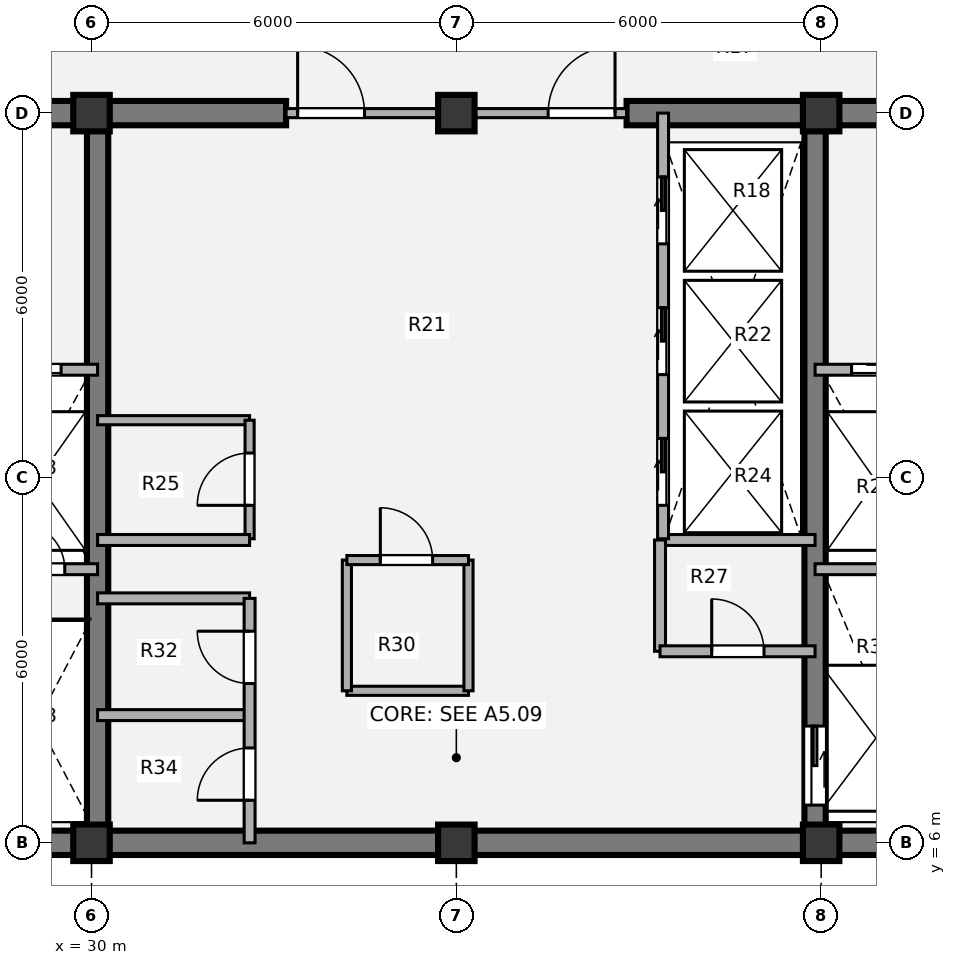
"""IFC4 building model, lengths in metres.
Left out: names, types, materials, properties, quantities, classifications, styles, units other than length and angle.
Written with IfcOpenShell. Run it as: python <this file> out.ifc"""

import sys

from ifc_helpers import new_model, si_unit, direction, frame, frame_2d, origin, origin_2d, place, context, subcontext, project, spatial, rectangle, extrude, source, transform, mapped, element, fill, save


model = new_model("IFC4")
c1 = context("Model", 3, precision=1e-05, world=origin(), true_north=direction((0.0, 1.0)))
c2 = subcontext(c1, "Body", "Model", "MODEL_VIEW")
j1 = project(units=[si_unit("LENGTHUNIT", "METRE"), si_unit("PLANEANGLEUNIT", "RADIAN")], contexts=[c1])
p1 = place(None, origin())
s1 = spatial("IfcSite", under=j1, at=p1, CompositionType="ELEMENT")
p2 = place(p1, origin())
s2 = spatial("IfcBuilding", under=s1, at=p2, CompositionType="ELEMENT")
p3 = place(p2, frame((0.0, 0.0, 241.92)))
s3 = spatial("IfcBuildingStorey", under=s2, at=p3, CompositionType="ELEMENT", Elevation=241.92)
m1 = source(origin(), c2, "Body", "SweptSolid", [
    extrude(rectangle(XDim=0.6, YDim=0.6, at=origin_2d()), origin(), (0.0, 0.0, 1.0), 3.78),
])
for number, where, z_axis, x_axis in (
    (1, (30.0, 6.0, 0.0), (0.0, 0.0, 1.0), (1.0, 0.0, 0.0)),
    (2, (36.0, 6.0, 0.0), (0.0, 0.0, 1.0), (1.0, 0.0, 0.0)),
    (3, (42.0, 6.0, 0.0), (0.0, 0.0, 1.0), (1.0, 0.0, 0.0)),
    (4, (30.0, 18.0, 0.0), (0.0, 0.0, 1.0), (1.0, 0.0, 0.0)),
    (5, (36.0, 18.0, 0.0), (0.0, 0.0, 1.0), (1.0, 0.0, 0.0)),
    (6, (42.0, 18.0, 0.0), (0.0, 0.0, 1.0), (1.0, 0.0, 0.0)),
):
    element("IfcColumn", number, at=place(p3, frame(where, z_axis=z_axis, x_axis=x_axis)), inside=s3, PredefinedType="COLUMN", context=c2, shape_type="MappedRepresentation", body=[
        mapped(m1, transform((0.0, 0.0, 0.0), x_axis=(1.0, 0.0, 0.0), y_axis=(0.0, 1.0, 0.0), z_axis=(0.0, 0.0, 1.0), scale=1.0)),
    ])
p4 = place(p3, frame((48.2, 6.0, 0.0), z_axis=(0.0, 0.0, 1.0), x_axis=(-1.0, 0.0, 0.0)))
e7 = element("IfcWall", 7, at=p4, inside=s3, PredefinedType="SHEAR", context=c2, shape_type="SweptSolid", body=[
    extrude(rectangle(XDim=24.4, YDim=0.4, at=frame_2d((12.2, 0.0))), origin(), (0.0, 0.0, 1.0), 3.78),
])
p5 = place(p3, frame((23.8, 18.0, 0.0), z_axis=(0.0, 0.0, 1.0), x_axis=(1.0, 0.0, 0.0)))
e8 = element("IfcWall", 8, at=p5, inside=s3, PredefinedType="SHEAR", context=c2, shape_type="SweptSolid", body=[
    extrude(rectangle(XDim=9.4, YDim=0.4, at=frame_2d((4.7, 0.0))), origin(), (0.0, 0.0, 1.0), 3.78),
])
p6 = place(p5, frame((2.95, 0.0, 0.0)))
e9 = element("IfcOpeningElement", 9, at=p6, cuts=e8, PredefinedType="OPENING", context=c2, shape_type="SweptSolid", body=[
    extrude(rectangle(XDim=1.1, YDim=2.1, at=origin_2d()), frame((0.55, 0.21, 1.05), z_axis=(0.0, -1.0, 0.0), x_axis=(1.0, 0.0, 0.0)), (0.0, 0.0, 1.0), 0.42),
])
p7 = place(p3, frame((38.8, 18.0, 0.0), z_axis=(0.0, 0.0, 1.0), x_axis=(1.0, 0.0, 0.0)))
e10 = element("IfcWall", 10, at=p7, inside=s3, PredefinedType="SHEAR", context=c2, shape_type="SweptSolid", body=[
    extrude(rectangle(XDim=9.4, YDim=0.4, at=frame_2d((4.7, 0.0))), origin(), (0.0, 0.0, 1.0), 3.78),
])
p8 = place(p7, frame((5.45, 0.0, 0.0)))
e11 = element("IfcOpeningElement", 11, at=p8, cuts=e10, PredefinedType="OPENING", context=c2, shape_type="SweptSolid", body=[
    extrude(rectangle(XDim=1.1, YDim=2.1, at=origin_2d()), frame((0.55, 0.21, 1.05), z_axis=(0.0, -1.0, 0.0), x_axis=(1.0, 0.0, 0.0)), (0.0, 0.0, 1.0), 0.42),
])
p9 = place(p3, frame((30.1, 6.0, 0.0), z_axis=(0.0, 0.0, 1.0), x_axis=(0.0, 1.0, 0.0)))
e12 = element("IfcWall", 12, at=p9, inside=s3, PredefinedType="SHEAR", context=c2, shape_type="SweptSolid", body=[
    extrude(rectangle(XDim=12.0, YDim=0.35, at=frame_2d((6.0, 0.0))), origin(), (0.0, 0.0, 1.0), 3.78),
])
p10 = place(p3, frame((41.9, 18.0, 0.0), z_axis=(0.0, 0.0, 1.0), x_axis=(0.0, -1.0, 0.0)))
e13 = element("IfcWall", 13, at=p10, inside=s3, PredefinedType="SHEAR", context=c2, shape_type="SweptSolid", body=[
    extrude(rectangle(XDim=12.0, YDim=0.35, at=frame_2d((6.0, 0.0))), origin(), (0.0, 0.0, 1.0), 3.78),
])
p11 = place(p10, frame((10.08, 0.0, 0.0)))
e14 = element("IfcOpeningElement", 14, at=p11, cuts=e13, PredefinedType="OPENING", context=c2, shape_type="SweptSolid", body=[
    extrude(rectangle(XDim=1.3, YDim=2.1, at=origin_2d()), frame((0.65, 0.185, 1.05), z_axis=(0.0, -1.0, 0.0), x_axis=(1.0, 0.0, 0.0)), (0.0, 0.0, 1.0), 0.37),
])
p12 = place(p3, frame((30.1, 12.95, 0.0), z_axis=(0.0, 0.0, 1.0), x_axis=(1.0, 0.0, 0.0)))
e15 = element("IfcWall", 15, at=p12, inside=s3, PredefinedType="PARTITIONING", context=c2, shape_type="SweptSolid", body=[
    extrude(rectangle(XDim=2.5, YDim=0.15, at=frame_2d((1.25, 0.0))), origin(), (0.0, 0.0, 1.0), 3.5),
])
p13 = place(p3, frame((32.6, 11.0, 0.0), z_axis=(0.0, 0.0, 1.0), x_axis=(0.0, 1.0, 0.0)))
e16 = element("IfcWall", 16, at=p13, inside=s3, PredefinedType="PARTITIONING", context=c2, shape_type="SweptSolid", body=[
    extrude(rectangle(XDim=1.95, YDim=0.15, at=frame_2d((0.975, 0.0))), origin(), (0.0, 0.0, 1.0), 3.5),
])
p14 = place(p13, frame((0.55, 0.0, 0.0)))
e17 = element("IfcOpeningElement", 17, at=p14, cuts=e16, PredefinedType="OPENING", context=c2, shape_type="SweptSolid", body=[
    extrude(rectangle(XDim=0.86, YDim=2.1, at=origin_2d()), frame((0.43, 0.085, 1.05), z_axis=(0.0, -1.0, 0.0), x_axis=(1.0, 0.0, 0.0)), (0.0, 0.0, 1.0), 0.17),
])
p15 = place(p3, frame((34.2, 8.5, 0.0), z_axis=(0.0, 0.0, 1.0), x_axis=(1.0, 0.0, 0.0)))
e18 = element("IfcWall", 18, at=p15, inside=s3, PredefinedType="PARTITIONING", context=c2, shape_type="SweptSolid", body=[
    extrude(rectangle(XDim=2.0, YDim=0.15, at=frame_2d((1.0, 0.0))), origin(), (0.0, 0.0, 1.0), 3.5),
])
p16 = place(p3, frame((34.2, 8.5, 0.0), z_axis=(0.0, 0.0, 1.0), x_axis=(0.0, 1.0, 0.0)))
e19 = element("IfcWall", 19, at=p16, inside=s3, PredefinedType="PARTITIONING", context=c2, shape_type="SweptSolid", body=[
    extrude(rectangle(XDim=2.15, YDim=0.15, at=frame_2d((1.075, 0.0))), origin(), (0.0, 0.0, 1.0), 3.5),
])
p17 = place(p3, frame((36.2, 8.5, 0.0), z_axis=(0.0, 0.0, 1.0), x_axis=(0.0, 1.0, 0.0)))
e20 = element("IfcWall", 20, at=p17, inside=s3, PredefinedType="PARTITIONING", context=c2, shape_type="SweptSolid", body=[
    extrude(rectangle(XDim=2.15, YDim=0.15, at=frame_2d((1.075, 0.0))), origin(), (0.0, 0.0, 1.0), 2.715),
])
p18 = place(p3, frame((34.2, 10.65, 0.0), z_axis=(0.0, 0.0, 1.0), x_axis=(1.0, 0.0, 0.0)))
e21 = element("IfcWall", 21, at=p18, inside=s3, PredefinedType="PARTITIONING", context=c2, shape_type="SweptSolid", body=[
    extrude(rectangle(XDim=2.0, YDim=0.15, at=frame_2d((1.0, 0.0))), origin(), (0.0, 0.0, 1.0), 3.5),
])
p19 = place(p18, frame((0.55, 0.0, 0.0)))
e22 = element("IfcOpeningElement", 22, at=p19, cuts=e21, PredefinedType="OPENING", context=c2, shape_type="SweptSolid", body=[
    extrude(rectangle(XDim=0.86, YDim=2.1, at=origin_2d()), frame((0.43, 0.085, 1.05), z_axis=(0.0, -1.0, 0.0), x_axis=(1.0, 0.0, 0.0)), (0.0, 0.0, 1.0), 0.17),
])
p20 = place(p3, frame((30.1, 10.98, 0.0), z_axis=(0.0, 0.0, 1.0), x_axis=(1.0, 0.0, 0.0)))
e23 = element("IfcWall", 23, at=p20, inside=s3, PredefinedType="PARTITIONING", context=c2, shape_type="SweptSolid", body=[
    extrude(rectangle(XDim=2.5, YDim=0.18, at=frame_2d((1.25, 0.0))), origin(), (0.0, 0.0, 1.0), 3.5),
])
p21 = place(p3, frame((39.35, 10.98, 0.0), z_axis=(0.0, 0.0, 1.0), x_axis=(1.0, 0.0, 0.0)))
e24 = element("IfcWall", 24, at=p21, inside=s3, PredefinedType="PARTITIONING", context=c2, shape_type="SweptSolid", body=[
    extrude(rectangle(XDim=2.55, YDim=0.18, at=frame_2d((1.275, 0.0))), origin(), (0.0, 0.0, 1.0), 3.5),
])
for number, where, z_axis, x_axis in (
    (25, (30.1, 8.1, 0.0), (0.0, 0.0, 1.0), (1.0, 0.0, 0.0)),
    (26, (30.1, 10.02, 0.0), (0.0, 0.0, 1.0), (1.0, 0.0, 0.0)),
):
    element("IfcWall", number, at=place(p3, frame(where, z_axis=z_axis, x_axis=x_axis)), inside=s3, PredefinedType="PARTITIONING", context=c2, shape_type="SweptSolid", body=[
        extrude(rectangle(XDim=2.5, YDim=0.18, at=frame_2d((1.25, 0.0))), origin(), (0.0, 0.0, 1.0), 3.5),
    ])
p22 = place(p3, frame((32.6, 6.0, 0.0), z_axis=(0.0, 0.0, 1.0), x_axis=(0.0, 1.0, 0.0)))
e27 = element("IfcWall", 27, at=p22, inside=s3, PredefinedType="PARTITIONING", context=c2, shape_type="SweptSolid", body=[
    extrude(rectangle(XDim=4.02, YDim=0.18, at=frame_2d((2.01, 0.0))), origin(), (0.0, 0.0, 1.0), 3.5),
])
p23 = place(p22, frame((0.7, 0.0, 0.0)))
e28 = element("IfcOpeningElement", 28, at=p23, cuts=e27, PredefinedType="OPENING", context=c2, shape_type="SweptSolid", body=[
    extrude(rectangle(XDim=0.86, YDim=2.1, at=origin_2d()), frame((0.43, 0.1, 1.05), z_axis=(0.0, -1.0, 0.0), x_axis=(1.0, 0.0, 0.0)), (0.0, 0.0, 1.0), 0.2),
])
p24 = place(p22, frame((2.62, 0.0, 0.0)))
e29 = element("IfcOpeningElement", 29, at=p24, cuts=e27, PredefinedType="OPENING", context=c2, shape_type="SweptSolid", body=[
    extrude(rectangle(XDim=0.86, YDim=2.1, at=origin_2d()), frame((0.43, 0.1, 1.05), z_axis=(0.0, -1.0, 0.0), x_axis=(1.0, 0.0, 0.0)), (0.0, 0.0, 1.0), 0.2),
])
p25 = place(p3, frame((39.35, 9.15, 0.0), z_axis=(0.0, 0.0, 1.0), x_axis=(0.0, 1.0, 0.0)))
e30 = element("IfcWall", 30, at=p25, inside=s3, PredefinedType="PARTITIONING", context=c2, shape_type="SweptSolid", body=[
    extrude(rectangle(XDim=1.83, YDim=0.18, at=frame_2d((0.915, 0.0))), origin(), (0.0, 0.0, 1.0), 3.5),
])
p26 = place(p3, frame((39.35, 9.15, 0.0), z_axis=(0.0, 0.0, 1.0), x_axis=(1.0, 0.0, 0.0)))
e31 = element("IfcWall", 31, at=p26, inside=s3, PredefinedType="PARTITIONING", context=c2, shape_type="SweptSolid", body=[
    extrude(rectangle(XDim=2.55, YDim=0.18, at=frame_2d((1.275, 0.0))), origin(), (0.0, 0.0, 1.0), 3.5),
])
p27 = place(p26, frame((0.85, 0.0, 0.0)))
e32 = element("IfcOpeningElement", 32, at=p27, cuts=e31, PredefinedType="OPENING", context=c2, shape_type="SweptSolid", body=[
    extrude(rectangle(XDim=0.86, YDim=2.1, at=origin_2d()), frame((0.43, 0.1, 1.05), z_axis=(0.0, -1.0, 0.0), x_axis=(1.0, 0.0, 0.0)), (0.0, 0.0, 1.0), 0.2),
])
p28 = place(p3, frame((33.2, 18.0, 0.0), z_axis=(0.0, 0.0, 1.0), x_axis=(1.0, 0.0, 0.0)))
e33 = element("IfcWall", 33, at=p28, inside=s3, PredefinedType="PARTITIONING", context=c2, shape_type="SweptSolid", body=[
    extrude(rectangle(XDim=5.6, YDim=0.15, at=frame_2d((2.8, 0.0))), origin(), (0.0, 0.0, 1.0), 2.515),
])
p29 = place(p28, frame((0.19, 0.0, 0.0)))
e34 = element("IfcOpeningElement", 34, at=p29, cuts=e33, PredefinedType="OPENING", context=c2, shape_type="SweptSolid", body=[
    extrude(rectangle(XDim=1.1, YDim=2.1, at=origin_2d()), frame((0.55, 0.085, 1.05), z_axis=(0.0, -1.0, 0.0), x_axis=(1.0, 0.0, 0.0)), (0.0, 0.0, 1.0), 0.17),
])
p30 = place(p28, frame((4.31, 0.0, 0.0)))
e35 = element("IfcOpeningElement", 35, at=p30, cuts=e33, PredefinedType="OPENING", context=c2, shape_type="SweptSolid", body=[
    extrude(rectangle(XDim=1.1, YDim=2.1, at=origin_2d()), frame((0.55, 0.085, 1.05), z_axis=(0.0, -1.0, 0.0), x_axis=(1.0, 0.0, 0.0)), (0.0, 0.0, 1.0), 0.17),
])
p31 = place(p3, frame((24.0, 13.78, 0.0), z_axis=(0.0, 0.0, 1.0), x_axis=(1.0, 0.0, 0.0)))
e36 = element("IfcWall", 36, at=p31, inside=s3, PredefinedType="PARTITIONING", context=c2, shape_type="SweptSolid", body=[
    extrude(rectangle(XDim=6.1, YDim=0.18, at=frame_2d((3.05, 0.0))), origin(), (0.0, 0.0, 1.0), 3.5),
])
p32 = place(p31, frame((1.15, 0.0, 0.0)))
e37 = element("IfcOpeningElement", 37, at=p32, cuts=e36, PredefinedType="OPENING", context=c2, shape_type="SweptSolid", body=[
    extrude(rectangle(XDim=1.1, YDim=2.1, at=origin_2d()), frame((0.55, 0.1, 1.05), z_axis=(0.0, -1.0, 0.0), x_axis=(1.0, 0.0, 0.0)), (0.0, 0.0, 1.0), 0.2),
])
p33 = place(p31, frame((4.4, 0.0, 0.0)))
e38 = element("IfcOpeningElement", 38, at=p33, cuts=e36, PredefinedType="OPENING", context=c2, shape_type="SweptSolid", body=[
    extrude(rectangle(XDim=1.1, YDim=2.1, at=origin_2d()), frame((0.55, 0.1, 1.05), z_axis=(0.0, -1.0, 0.0), x_axis=(1.0, 0.0, 0.0)), (0.0, 0.0, 1.0), 0.2),
])
p34 = place(p3, frame((28.15, 10.5, 0.0), z_axis=(0.0, 0.0, 1.0), x_axis=(1.0, 0.0, 0.0)))
e39 = element("IfcWall", 39, at=p34, inside=s3, PredefinedType="PARTITIONING", context=c2, shape_type="SweptSolid", body=[
    extrude(rectangle(XDim=1.95, YDim=0.18, at=frame_2d((0.975, 0.0))), origin(), (0.0, 0.0, 1.0), 3.5),
])
p35 = place(p34, frame((0.65, 0.0, 0.0)))
e40 = element("IfcOpeningElement", 40, at=p35, cuts=e39, PredefinedType="OPENING", context=c2, shape_type="SweptSolid", body=[
    extrude(rectangle(XDim=0.76, YDim=2.05, at=origin_2d()), frame((0.38, 0.1, 1.025), z_axis=(0.0, -1.0, 0.0), x_axis=(1.0, 0.0, 0.0)), (0.0, 0.0, 1.0), 0.2),
])
p36 = place(p3, frame((41.9, 13.78, 0.0), z_axis=(0.0, 0.0, 1.0), x_axis=(1.0, 0.0, 0.0)))
e41 = element("IfcWall", 41, at=p36, inside=s3, PredefinedType="PARTITIONING", context=c2, shape_type="SweptSolid", body=[
    extrude(rectangle(XDim=6.1, YDim=0.18, at=frame_2d((3.05, 0.0))), origin(), (0.0, 0.0, 1.0), 3.5),
])
p37 = place(p36, frame((0.6, 0.0, 0.0)))
e42 = element("IfcOpeningElement", 42, at=p37, cuts=e41, PredefinedType="OPENING", context=c2, shape_type="SweptSolid", body=[
    extrude(rectangle(XDim=1.1, YDim=2.1, at=origin_2d()), frame((0.55, 0.1, 1.05), z_axis=(0.0, -1.0, 0.0), x_axis=(1.0, 0.0, 0.0)), (0.0, 0.0, 1.0), 0.2),
])
p38 = place(p36, frame((3.8, 0.0, 0.0)))
e43 = element("IfcOpeningElement", 43, at=p38, cuts=e41, PredefinedType="OPENING", context=c2, shape_type="SweptSolid", body=[
    extrude(rectangle(XDim=1.1, YDim=2.1, at=origin_2d()), frame((0.55, 0.1, 1.05), z_axis=(0.0, -1.0, 0.0), x_axis=(1.0, 0.0, 0.0)), (0.0, 0.0, 1.0), 0.2),
])
p39 = place(p3, frame((41.9, 10.5, 0.0), z_axis=(0.0, 0.0, 1.0), x_axis=(1.0, 0.0, 0.0)))
e44 = element("IfcWall", 44, at=p39, inside=s3, PredefinedType="PARTITIONING", context=c2, shape_type="SweptSolid", body=[
    extrude(rectangle(XDim=1.95, YDim=0.18, at=frame_2d((0.975, 0.0))), origin(), (0.0, 0.0, 1.0), 3.5),
])
p40 = place(p3, frame((39.4, 11.0, 0.0), z_axis=(0.0, 0.0, 1.0), x_axis=(0.0, 1.0, 0.0)))
e45 = element("IfcWall", 45, at=p40, inside=s3, PredefinedType="PARTITIONING", context=c2, shape_type="SweptSolid", body=[
    extrude(rectangle(XDim=7.0, YDim=0.18, at=frame_2d((3.5, 0.0))), origin(), (0.0, 0.0, 1.0), 3.5),
])
p41 = place(p40, frame((0.55, 0.0, 0.0)))
e46 = element("IfcOpeningElement", 46, at=p41, cuts=e45, PredefinedType="OPENING", context=c2, shape_type="SweptSolid", body=[
    extrude(rectangle(XDim=1.1, YDim=2.1, at=origin_2d()), frame((0.55, 0.1, 1.05), z_axis=(0.0, -1.0, 0.0), x_axis=(1.0, 0.0, 0.0)), (0.0, 0.0, 1.0), 0.2),
])
p42 = place(p40, frame((2.7, 0.0, 0.0)))
e47 = element("IfcOpeningElement", 47, at=p42, cuts=e45, PredefinedType="OPENING", context=c2, shape_type="SweptSolid", body=[
    extrude(rectangle(XDim=1.1, YDim=2.1, at=origin_2d()), frame((0.55, 0.1, 1.05), z_axis=(0.0, -1.0, 0.0), x_axis=(1.0, 0.0, 0.0)), (0.0, 0.0, 1.0), 0.2),
])
p43 = place(p40, frame((4.85, 0.0, 0.0)))
e48 = element("IfcOpeningElement", 48, at=p43, cuts=e45, PredefinedType="OPENING", context=c2, shape_type="SweptSolid", body=[
    extrude(rectangle(XDim=1.1, YDim=2.1, at=origin_2d()), frame((0.55, 0.1, 1.05), z_axis=(0.0, -1.0, 0.0), x_axis=(1.0, 0.0, 0.0)), (0.0, 0.0, 1.0), 0.2),
])
m2 = source(origin(), c2, "Body", "SweptSolid", [
    extrude(rectangle(XDim=0.86, YDim=2.1, at=origin_2d()), frame((0.43, 0.025, 1.05), z_axis=(0.0, -1.0, 0.0), x_axis=(1.0, 0.0, 0.0)), (0.0, 0.0, 1.0), 0.05),
])
p44 = place(p14, origin())
e49 = element("IfcDoor", 49, at=p44, inside=s3, OperationType="SINGLE_SWING_LEFT", PredefinedType="DOOR", context=c2, shape_type="MappedRepresentation", body=[
    mapped(m2, transform((0.0, 0.0, 0.0), x_axis=(1.0, 0.0, 0.0), y_axis=(0.0, 1.0, 0.0), z_axis=(0.0, 0.0, 1.0), scale=1.0)),
])
fill(e17, e49)
p45 = place(p19, origin())
e50 = element("IfcDoor", 50, at=p45, inside=s3, OperationType="SINGLE_SWING_LEFT", PredefinedType="DOOR", context=c2, shape_type="MappedRepresentation", body=[
    mapped(m2, transform((0.0, 0.0, 0.0), x_axis=(1.0, 0.0, 0.0), y_axis=(0.0, 1.0, 0.0), z_axis=(0.0, 0.0, 1.0), scale=1.0)),
])
fill(e22, e50)
p46 = place(p23, origin())
e51 = element("IfcDoor", 51, at=p46, inside=s3, OperationType="SINGLE_SWING_LEFT", PredefinedType="DOOR", context=c2, shape_type="MappedRepresentation", body=[
    mapped(m2, transform((0.0, 0.0, 0.0), x_axis=(1.0, 0.0, 0.0), y_axis=(0.0, 1.0, 0.0), z_axis=(0.0, 0.0, 1.0), scale=1.0)),
])
fill(e28, e51)
p47 = place(p24, origin())
e52 = element("IfcDoor", 52, at=p47, inside=s3, OperationType="SINGLE_SWING_RIGHT", PredefinedType="DOOR", context=c2, shape_type="MappedRepresentation", body=[
    mapped(m2, transform((0.0, 0.0, 0.0), x_axis=(1.0, 0.0, 0.0), y_axis=(0.0, 1.0, 0.0), z_axis=(0.0, 0.0, 1.0), scale=1.0)),
])
fill(e29, e52)
p48 = place(p27, origin())
e53 = element("IfcDoor", 53, at=p48, inside=s3, OperationType="SINGLE_SWING_LEFT", PredefinedType="DOOR", context=c2, shape_type="MappedRepresentation", body=[
    mapped(m2, transform((0.0, 0.0, 0.0), x_axis=(1.0, 0.0, 0.0), y_axis=(0.0, 1.0, 0.0), z_axis=(0.0, 0.0, 1.0), scale=1.0)),
])
fill(e32, e53)
m3 = source(origin(), c2, "Body", "SweptSolid", [
    extrude(rectangle(XDim=1.1, YDim=2.1, at=origin_2d()), frame((0.55, 0.025, 1.05), z_axis=(0.0, -1.0, 0.0), x_axis=(1.0, 0.0, 0.0)), (0.0, 0.0, 1.0), 0.05),
])
p49 = place(p29, origin())
e54 = element("IfcDoor", 54, at=p49, inside=s3, OperationType="SINGLE_SWING_LEFT", PredefinedType="DOOR", context=c2, shape_type="MappedRepresentation", body=[
    mapped(m3, transform((0.0, 0.0, 0.0), x_axis=(1.0, 0.0, 0.0), y_axis=(0.0, 1.0, 0.0), z_axis=(0.0, 0.0, 1.0), scale=1.0)),
])
fill(e34, e54)
p50 = place(p30, origin())
e55 = element("IfcDoor", 55, at=p50, inside=s3, OperationType="SINGLE_SWING_RIGHT", PredefinedType="DOOR", context=c2, shape_type="MappedRepresentation", body=[
    mapped(m3, transform((0.0, 0.0, 0.0), x_axis=(1.0, 0.0, 0.0), y_axis=(0.0, 1.0, 0.0), z_axis=(0.0, 0.0, 1.0), scale=1.0)),
])
fill(e35, e55)
m4 = source(origin(), c2, "Body", "SweptSolid", [
    extrude(rectangle(XDim=1.1, YDim=2.1, at=origin_2d()), frame((0.55, 0.025, 1.05), z_axis=(0.0, -1.0, 0.0), x_axis=(1.0, 0.0, 0.0)), (0.0, 0.0, 1.0), 0.05),
])
p51 = place(p33, origin())
e56 = element("IfcDoor", 56, at=p51, inside=s3, OperationType="SLIDING_TO_LEFT", PredefinedType="DOOR", context=c2, shape_type="MappedRepresentation", body=[
    mapped(m4, transform((0.0, 0.0, 0.0), x_axis=(1.0, 0.0, 0.0), y_axis=(0.0, 1.0, 0.0), z_axis=(0.0, 0.0, 1.0), scale=1.0)),
])
fill(e38, e56)
m5 = source(origin(), c2, "Body", "SweptSolid", [
    extrude(rectangle(XDim=0.76, YDim=2.05, at=origin_2d()), frame((0.38, 0.025, 1.025), z_axis=(0.0, -1.0, 0.0), x_axis=(1.0, 0.0, 0.0)), (0.0, 0.0, 1.0), 0.05),
])
p52 = place(p35, origin())
e57 = element("IfcDoor", 57, at=p52, inside=s3, OperationType="SINGLE_SWING_LEFT", PredefinedType="DOOR", context=c2, shape_type="MappedRepresentation", body=[
    mapped(m5, transform((0.0, 0.0, 0.0), x_axis=(1.0, 0.0, 0.0), y_axis=(0.0, 1.0, 0.0), z_axis=(0.0, 0.0, 1.0), scale=1.0)),
])
fill(e40, e57)
p53 = place(p37, origin())
e58 = element("IfcDoor", 58, at=p53, inside=s3, OperationType="SLIDING_TO_RIGHT", PredefinedType="DOOR", context=c2, shape_type="MappedRepresentation", body=[
    mapped(m4, transform((0.0, 0.0, 0.0), x_axis=(1.0, 0.0, 0.0), y_axis=(0.0, 1.0, 0.0), z_axis=(0.0, 0.0, 1.0), scale=1.0)),
])
fill(e42, e58)
m6 = source(origin(), c2, "Body", "SweptSolid", [
    extrude(rectangle(XDim=1.3, YDim=2.1, at=origin_2d()), frame((0.65, 0.025, 1.05), z_axis=(0.0, -1.0, 0.0), x_axis=(1.0, 0.0, 0.0)), (0.0, 0.0, 1.0), 0.05),
])
p54 = place(p11, origin())
e59 = element("IfcDoor", 59, at=p54, inside=s3, OperationType="SLIDING_TO_LEFT", PredefinedType="DOOR", context=c2, shape_type="MappedRepresentation", body=[
    mapped(m6, transform((0.0, 0.0, 0.0), x_axis=(1.0, 0.0, 0.0), y_axis=(0.0, 1.0, 0.0), z_axis=(0.0, 0.0, 1.0), scale=1.0)),
])
fill(e14, e59)
p55 = place(p41, origin())
e60 = element("IfcDoor", 60, at=p55, inside=s3, OperationType="SLIDING_TO_RIGHT", PredefinedType="DOOR", context=c2, shape_type="MappedRepresentation", body=[
    mapped(m4, transform((0.0, 0.0, 0.0), x_axis=(1.0, 0.0, 0.0), y_axis=(0.0, 1.0, 0.0), z_axis=(0.0, 0.0, 1.0), scale=1.0)),
])
fill(e46, e60)
p56 = place(p42, origin())
e61 = element("IfcDoor", 61, at=p56, inside=s3, OperationType="SLIDING_TO_RIGHT", PredefinedType="DOOR", context=c2, shape_type="MappedRepresentation", body=[
    mapped(m4, transform((0.0, 0.0, 0.0), x_axis=(1.0, 0.0, 0.0), y_axis=(0.0, 1.0, 0.0), z_axis=(0.0, 0.0, 1.0), scale=1.0)),
])
fill(e47, e61)
p57 = place(p43, origin())
e62 = element("IfcDoor", 62, at=p57, inside=s3, OperationType="SLIDING_TO_RIGHT", PredefinedType="DOOR", context=c2, shape_type="MappedRepresentation", body=[
    mapped(m4, transform((0.0, 0.0, 0.0), x_axis=(1.0, 0.0, 0.0), y_axis=(0.0, 1.0, 0.0), z_axis=(0.0, 0.0, 1.0), scale=1.0)),
])
fill(e48, e62)
save(model, sys.argv[1])
